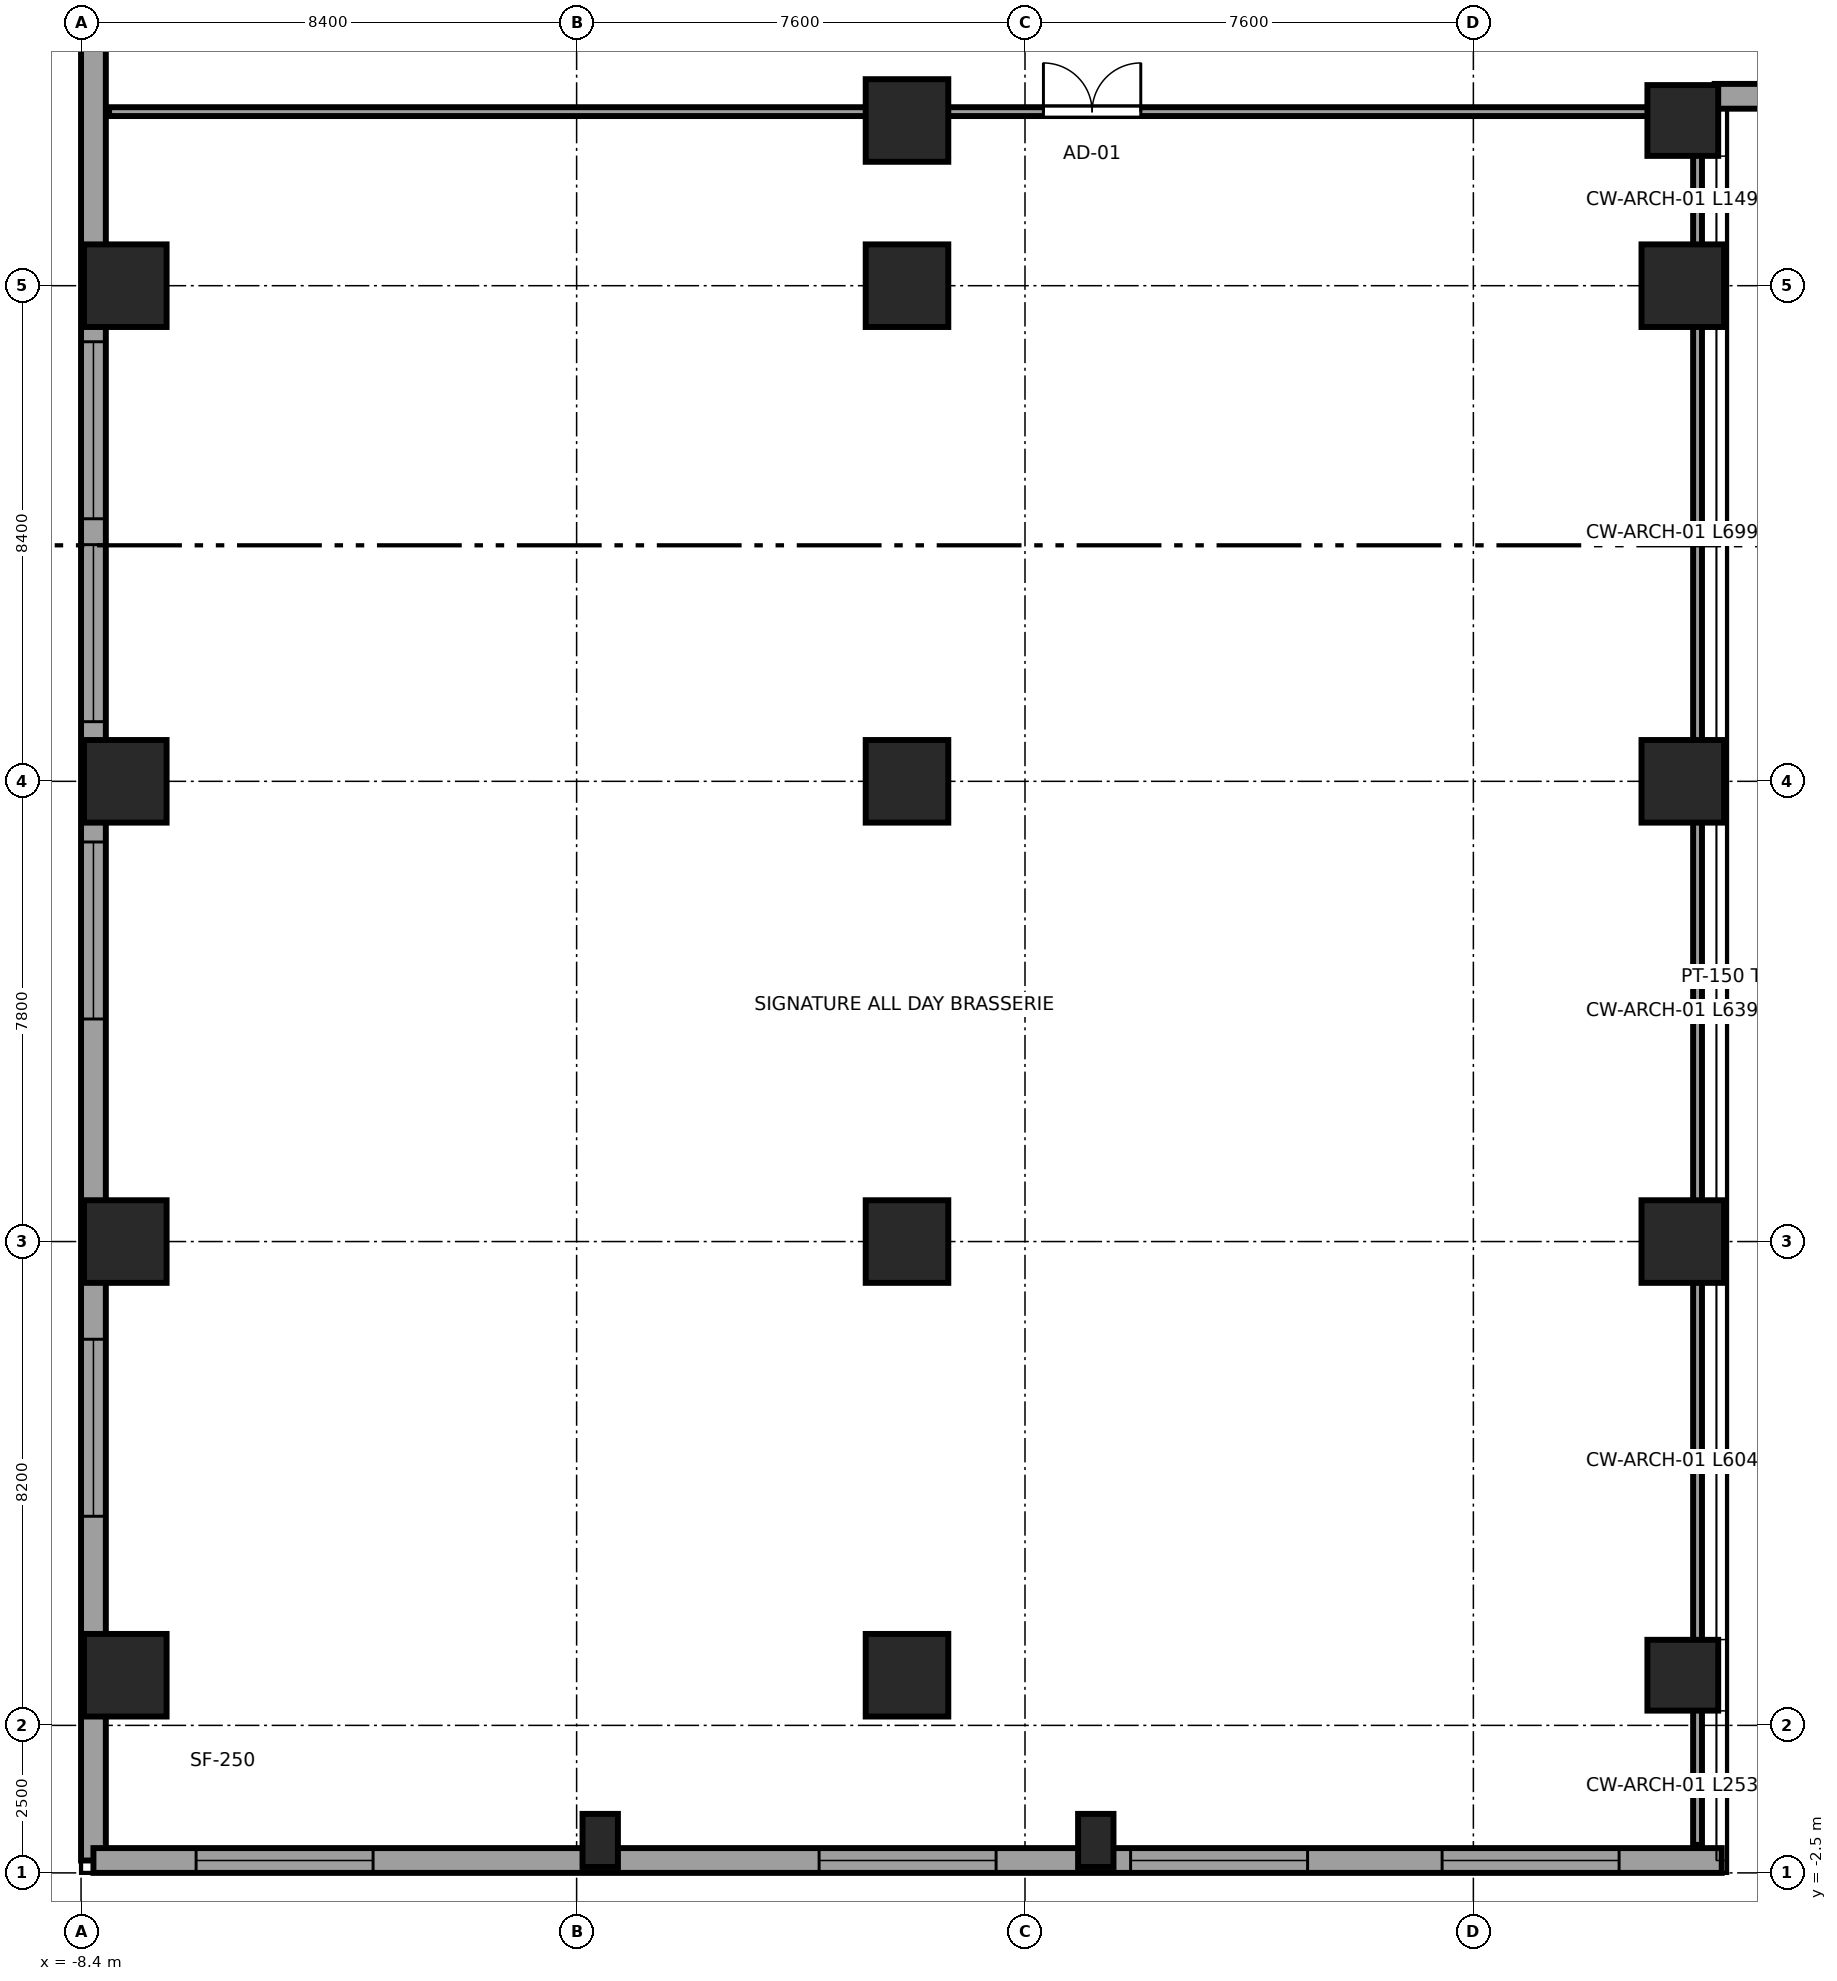
"""IFC4 building model, lengths in metres.
Left out: names, types, materials, properties, quantities, classifications, styles, units other than length and angle.
Written with IfcOpenShell. Run it as: python <this file> out.ifc"""

import sys

from ifc_helpers import new_model, si_unit, direction, frame, frame_2d, origin, origin_2d, place, context, subcontext, project, spatial, rectangle, circle, extrude, source, transform, mapped, element, fill, save


model = new_model("IFC4")
c1 = context("Model", 3, precision=1e-05, world=origin(), true_north=direction((0.0, 1.0)))
c2 = subcontext(c1, "Body", "Model", "MODEL_VIEW")
j1 = project(units=[si_unit("LENGTHUNIT", "METRE"), si_unit("PLANEANGLEUNIT", "RADIAN")], contexts=[c1])
p1 = place(None, origin())
s1 = spatial("IfcSite", under=j1, at=p1, CompositionType="ELEMENT")
p2 = place(p1, origin())
s2 = spatial("IfcBuilding", under=s1, at=p2, CompositionType="ELEMENT")
p3 = place(p2, frame((0.0, 0.0, 6.0)))
s3 = spatial("IfcBuildingStorey", under=s2, at=p3, CompositionType="ELEMENT", Elevation=6.0)
m1 = source(origin(), c2, "Body", "SweptSolid", [
    extrude(rectangle(XDim=1.4, YDim=1.4, at=origin_2d()), origin(), (0.0, 0.0, 1.0), 5.0),
])
for number, where, z_axis, x_axis in (
    (1, (-7.65, 0.85, 0.0), (0.0, 0.0, 1.0), (1.0, 0.0, 0.0)),
    (2, (-7.65, 8.2, 0.0), (0.0, 0.0, 1.0), (1.0, 0.0, 0.0)),
    (3, (-7.65, 16.0, 0.0), (0.0, 0.0, 1.0), (1.0, 0.0, 0.0)),
    (4, (-7.65, 24.4, 0.0), (0.0, 0.0, 1.0), (1.0, 0.0, 0.0)),
):
    element("IfcColumn", number, at=place(p3, frame(where, z_axis=z_axis, x_axis=x_axis)), inside=s3, PredefinedType="COLUMN", context=c2, shape_type="MappedRepresentation", body=[
        mapped(m1, transform((0.0, 0.0, 0.0), x_axis=(1.0, 0.0, 0.0), y_axis=(0.0, 1.0, 0.0), z_axis=(0.0, 0.0, 1.0), scale=1.0)),
    ])
m2 = source(origin(), c2, "Body", "SweptSolid", [
    extrude(circle(Radius=0.6, at=origin_2d()), origin(), (0.0, 0.0, 1.0), 5.0),
])
p4 = place(p3, frame((18.75, 0.85, 0.0), z_axis=(0.0, 0.0, 1.0), x_axis=(1.0, 0.0, 0.0)))
e5 = element("IfcColumn", 5, at=p4, inside=s3, PredefinedType="COLUMN", context=c2, shape_type="MappedRepresentation", body=[
    mapped(m2, transform((0.0, 0.0, 0.0), x_axis=(1.0, 0.0, 0.0), y_axis=(0.0, 1.0, 0.0), z_axis=(0.0, 0.0, 1.0), scale=1.0)),
])
for number, where, z_axis, x_axis in (
    (6, (18.75, 8.2, 0.0), (0.0, 0.0, 1.0), (1.0, 0.0, 0.0)),
    (7, (18.75, 16.0, 0.0), (0.0, 0.0, 1.0), (1.0, 0.0, 0.0)),
    (8, (18.75, 24.4, 0.0), (0.0, 0.0, 1.0), (1.0, 0.0, 0.0)),
):
    element("IfcColumn", number, at=place(p3, frame(where, z_axis=z_axis, x_axis=x_axis)), inside=s3, PredefinedType="COLUMN", context=c2, shape_type="MappedRepresentation", body=[
        mapped(m1, transform((0.0, 0.0, 0.0), x_axis=(1.0, 0.0, 0.0), y_axis=(0.0, 1.0, 0.0), z_axis=(0.0, 0.0, 1.0), scale=1.0)),
    ])
p5 = place(p3, frame((18.75, 27.2, 0.0), z_axis=(0.0, 0.0, 1.0), x_axis=(1.0, 0.0, 0.0)))
e9 = element("IfcColumn", 9, at=p5, inside=s3, PredefinedType="COLUMN", context=c2, shape_type="MappedRepresentation", body=[
    mapped(m2, transform((0.0, 0.0, 0.0), x_axis=(1.0, 0.0, 0.0), y_axis=(0.0, 1.0, 0.0), z_axis=(0.0, 0.0, 1.0), scale=1.0)),
])
for number, where, z_axis, x_axis in (
    (10, (5.6, 0.85, 0.0), (0.0, 0.0, 1.0), (1.0, 0.0, 0.0)),
    (11, (5.6, 8.2, 0.0), (0.0, 0.0, 1.0), (1.0, 0.0, 0.0)),
    (12, (5.6, 16.0, 0.0), (0.0, 0.0, 1.0), (1.0, 0.0, 0.0)),
    (13, (5.6, 24.4, 0.0), (0.0, 0.0, 1.0), (1.0, 0.0, 0.0)),
    (14, (5.6, 27.2, 0.0), (0.0, 0.0, 1.0), (1.0, 0.0, 0.0)),
):
    element("IfcColumn", number, at=place(p3, frame(where, z_axis=z_axis, x_axis=x_axis)), inside=s3, PredefinedType="COLUMN", context=c2, shape_type="MappedRepresentation", body=[
        mapped(m1, transform((0.0, 0.0, 0.0), x_axis=(1.0, 0.0, 0.0), y_axis=(0.0, 1.0, 0.0), z_axis=(0.0, 0.0, 1.0), scale=1.0)),
    ])
m3 = source(origin(), c2, "Body", "SweptSolid", [
    extrude(rectangle(XDim=0.6, YDim=0.9, at=origin_2d()), origin(), (0.0, 0.0, 1.0), 5.0),
])
for number, where, z_axis, x_axis in (
    (15, (0.4, -1.95, 0.0), (0.0, 0.0, 1.0), (1.0, 0.0, 0.0)),
    (16, (8.8, -1.95, 0.0), (0.0, 0.0, 1.0), (1.0, 0.0, 0.0)),
):
    element("IfcColumn", number, at=place(p3, frame(where, z_axis=z_axis, x_axis=x_axis)), inside=s3, PredefinedType="PILASTER", context=c2, shape_type="MappedRepresentation", body=[
        mapped(m3, transform((0.0, 0.0, 0.0), x_axis=(1.0, 0.0, 0.0), y_axis=(0.0, 1.0, 0.0), z_axis=(0.0, 0.0, 1.0), scale=1.0)),
    ])
p6 = place(p3, frame((19.29, 27.61, 0.0), z_axis=(0.0, 0.0, 1.0), x_axis=(1.0, 0.0, 0.0)))
e17 = element("IfcWall", 17, at=p6, inside=s3, PredefinedType="SOLIDWALL", context=c2, shape_type="SweptSolid", body=[
    extrude(rectangle(XDim=18.42, YDim=0.42, at=frame_2d((9.21, 0.0))), origin(), (0.0, 0.0, 1.0), 4.74),
])
p7 = place(p6, frame((1.97, 0.0, 0.65)))
e18 = element("IfcOpeningElement", 18, at=p7, cuts=e17, PredefinedType="OPENING", context=c2, shape_type="SweptSolid", body=[
    extrude(rectangle(XDim=3.0, YDim=2.5, at=frame_2d((1.5, 1.25))), frame((0.0, 0.22, 0.0), z_axis=(0.0, -1.0, 0.0), x_axis=(1.0, 0.0, 0.0)), (0.0, 0.0, 1.0), 0.44),
])
p8 = place(p6, frame((7.71, 0.0, 0.65)))
e19 = element("IfcOpeningElement", 19, at=p8, cuts=e17, PredefinedType="OPENING", context=c2, shape_type="SweptSolid", body=[
    extrude(rectangle(XDim=3.0, YDim=2.5, at=frame_2d((1.5, 1.25))), frame((0.0, 0.22, 0.0), z_axis=(0.0, -1.0, 0.0), x_axis=(1.0, 0.0, 0.0)), (0.0, 0.0, 1.0), 0.44),
])
p9 = place(p6, frame((13.45, 0.0, 0.65)))
e20 = element("IfcOpeningElement", 20, at=p9, cuts=e17, PredefinedType="OPENING", context=c2, shape_type="SweptSolid", body=[
    extrude(rectangle(XDim=3.0, YDim=2.5, at=frame_2d((1.5, 1.25))), frame((0.0, 0.22, 0.0), z_axis=(0.0, -1.0, 0.0), x_axis=(1.0, 0.0, 0.0)), (0.0, 0.0, 1.0), 0.44),
])
p10 = place(p3, frame((-8.19, 48.29, 0.0), z_axis=(0.0, 0.0, 1.0), x_axis=(0.0, -1.0, 0.0)))
e21 = element("IfcWall", 21, at=p10, inside=s3, PredefinedType="SOLIDWALL", context=c2, shape_type="SweptSolid", body=[
    extrude(rectangle(XDim=50.58, YDim=0.42, at=frame_2d((25.29, 0.0))), origin(), (0.0, 0.0, 1.0), 4.74),
])
p11 = place(p10, frame((5.834, 0.0, 0.65)))
e22 = element("IfcOpeningElement", 22, at=p11, cuts=e21, PredefinedType="OPENING", context=c2, shape_type="SweptSolid", body=[
    extrude(rectangle(XDim=3.0, YDim=2.5, at=frame_2d((1.5, 1.25))), frame((0.0, 0.22, 0.0), z_axis=(0.0, -1.0, 0.0), x_axis=(1.0, 0.0, 0.0)), (0.0, 0.0, 1.0), 0.44),
])
p12 = place(p10, frame((10.323, 0.0, 0.65)))
e23 = element("IfcOpeningElement", 23, at=p12, cuts=e21, PredefinedType="OPENING", context=c2, shape_type="SweptSolid", body=[
    extrude(rectangle(XDim=3.0, YDim=2.5, at=frame_2d((1.5, 1.25))), frame((0.0, 0.22, 0.0), z_axis=(0.0, -1.0, 0.0), x_axis=(1.0, 0.0, 0.0)), (0.0, 0.0, 1.0), 0.44),
])
p13 = place(p10, frame((24.84, 0.0, 0.65)))
e24 = element("IfcOpeningElement", 24, at=p13, cuts=e21, PredefinedType="OPENING", context=c2, shape_type="SweptSolid", body=[
    extrude(rectangle(XDim=3.0, YDim=2.5, at=frame_2d((1.5, 1.25))), frame((0.0, 0.22, 0.0), z_axis=(0.0, -1.0, 0.0), x_axis=(1.0, 0.0, 0.0)), (0.0, 0.0, 1.0), 0.44),
])
p14 = place(p10, frame((28.279, 0.0, 0.65)))
e25 = element("IfcOpeningElement", 25, at=p14, cuts=e21, PredefinedType="OPENING", context=c2, shape_type="SweptSolid", body=[
    extrude(rectangle(XDim=3.0, YDim=2.5, at=frame_2d((1.5, 1.25))), frame((0.0, 0.22, 0.0), z_axis=(0.0, -1.0, 0.0), x_axis=(1.0, 0.0, 0.0)), (0.0, 0.0, 1.0), 0.44),
])
p15 = place(p10, frame((33.318, 0.0, 0.65)))
e26 = element("IfcOpeningElement", 26, at=p15, cuts=e21, PredefinedType="OPENING", context=c2, shape_type="SweptSolid", body=[
    extrude(rectangle(XDim=3.0, YDim=2.5, at=frame_2d((1.5, 1.25))), frame((0.0, 0.22, 0.0), z_axis=(0.0, -1.0, 0.0), x_axis=(1.0, 0.0, 0.0)), (0.0, 0.0, 1.0), 0.44),
])
p16 = place(p10, frame((41.746, 0.0, 0.65)))
e27 = element("IfcOpeningElement", 27, at=p16, cuts=e21, PredefinedType="OPENING", context=c2, shape_type="SweptSolid", body=[
    extrude(rectangle(XDim=3.0, YDim=2.5, at=frame_2d((1.5, 1.25))), frame((0.0, 0.22, 0.0), z_axis=(0.0, -1.0, 0.0), x_axis=(1.0, 0.0, 0.0)), (0.0, 0.0, 1.0), 0.44),
])
p17 = place(p3, frame((-8.19, -2.29, 0.0), z_axis=(0.0, 0.0, 1.0), x_axis=(1.0, 0.0, 0.0)))
e28 = element("IfcWall", 28, at=p17, inside=s3, PredefinedType="SOLIDWALL", context=c2, shape_type="SweptSolid", body=[
    extrude(rectangle(XDim=27.6, YDim=0.42, at=frame_2d((13.8, 0.0))), origin(), (0.0, 0.0, 1.0), 4.74),
])
p18 = place(p17, frame((1.74, 0.0, 0.65)))
e29 = element("IfcOpeningElement", 29, at=p18, cuts=e28, PredefinedType="OPENING", context=c2, shape_type="SweptSolid", body=[
    extrude(rectangle(XDim=3.0, YDim=2.5, at=frame_2d((1.5, 1.25))), frame((0.0, 0.22, 0.0), z_axis=(0.0, -1.0, 0.0), x_axis=(1.0, 0.0, 0.0)), (0.0, 0.0, 1.0), 0.44),
])
p19 = place(p17, frame((12.3, 0.0, 0.65)))
e30 = element("IfcOpeningElement", 30, at=p19, cuts=e28, PredefinedType="OPENING", context=c2, shape_type="SweptSolid", body=[
    extrude(rectangle(XDim=3.0, YDim=2.5, at=frame_2d((1.5, 1.25))), frame((0.0, 0.22, 0.0), z_axis=(0.0, -1.0, 0.0), x_axis=(1.0, 0.0, 0.0)), (0.0, 0.0, 1.0), 0.44),
])
p20 = place(p17, frame((17.58, 0.0, 0.65)))
e31 = element("IfcOpeningElement", 31, at=p20, cuts=e28, PredefinedType="OPENING", context=c2, shape_type="SweptSolid", body=[
    extrude(rectangle(XDim=3.0, YDim=2.5, at=frame_2d((1.5, 1.25))), frame((0.0, 0.22, 0.0), z_axis=(0.0, -1.0, 0.0), x_axis=(1.0, 0.0, 0.0)), (0.0, 0.0, 1.0), 0.44),
])
p21 = place(p17, frame((22.86, 0.0, 0.65)))
e32 = element("IfcOpeningElement", 32, at=p21, cuts=e28, PredefinedType="OPENING", context=c2, shape_type="SweptSolid", body=[
    extrude(rectangle(XDim=3.0, YDim=2.5, at=frame_2d((1.5, 1.25))), frame((0.0, 0.22, 0.0), z_axis=(0.0, -1.0, 0.0), x_axis=(1.0, 0.0, 0.0)), (0.0, 0.0, 1.0), 0.44),
])
p22 = place(p3, frame((-7.925, 27.35, 0.0), z_axis=(0.0, 0.0, 1.0), x_axis=(1.0, 0.0, 0.0)))
e33 = element("IfcWall", 33, at=p22, inside=s3, PredefinedType="PARTITIONING", context=c2, shape_type="SweptSolid", body=[
    extrude(rectangle(XDim=26.925, YDim=0.15, at=frame_2d((13.462, 0.0))), origin(), (0.0, 0.0, 1.0), 3.53),
])
p23 = place(p22, frame((15.837, 0.0, 0.0)))
e34 = element("IfcOpeningElement", 34, at=p23, cuts=e33, PredefinedType="OPENING", context=c2, shape_type="SweptSolid", body=[
    extrude(rectangle(XDim=1.65, YDim=2.15, at=frame_2d((0.825, 1.075))), frame((0.0, 0.085, 0.0), z_axis=(0.0, -1.0, 0.0), x_axis=(1.0, 0.0, 0.0)), (0.0, 0.0, 1.0), 0.17),
])
p24 = place(p3, frame((19.0, -2.025, 0.0), z_axis=(0.0, 0.0, 1.0), x_axis=(0.0, 1.0, 0.0)))
e35 = element("IfcWall", 35, at=p24, inside=s3, PredefinedType="PARTITIONING", context=c2, shape_type="SweptSolid", body=[
    extrude(rectangle(XDim=29.425, YDim=0.15, at=frame_2d((14.712, 0.0))), origin(), (0.0, 0.0, 1.0), 4.74),
])
m4 = source(origin(), c2, "Body", "SweptSolid", [
    extrude(rectangle(XDim=3.0, YDim=2.5, at=frame_2d((1.5, 1.25))), frame((0.0, 0.09, 0.0), z_axis=(0.0, -1.0, 0.0), x_axis=(1.0, 0.0, 0.0)), (0.0, 0.0, 1.0), 0.06),
])
p25 = place(p13, origin())
e36 = element("IfcWindow", 36, at=p25, inside=s3, PartitioningType="TRIPLE_PANEL_HORIZONTAL", PredefinedType="WINDOW", context=c2, shape_type="MappedRepresentation", body=[
    mapped(m4, transform((0.0, 0.0, 0.0), x_axis=(1.0, 0.0, 0.0), y_axis=(0.0, 1.0, 0.0), z_axis=(0.0, 0.0, 1.0), scale=1.0)),
])
fill(e24, e36)
p26 = place(p14, origin())
e37 = element("IfcWindow", 37, at=p26, inside=s3, PartitioningType="TRIPLE_PANEL_HORIZONTAL", PredefinedType="WINDOW", context=c2, shape_type="MappedRepresentation", body=[
    mapped(m4, transform((0.0, 0.0, 0.0), x_axis=(1.0, 0.0, 0.0), y_axis=(0.0, 1.0, 0.0), z_axis=(0.0, 0.0, 1.0), scale=1.0)),
])
fill(e25, e37)
p27 = place(p15, origin())
e38 = element("IfcWindow", 38, at=p27, inside=s3, PartitioningType="TRIPLE_PANEL_HORIZONTAL", PredefinedType="WINDOW", context=c2, shape_type="MappedRepresentation", body=[
    mapped(m4, transform((0.0, 0.0, 0.0), x_axis=(1.0, 0.0, 0.0), y_axis=(0.0, 1.0, 0.0), z_axis=(0.0, 0.0, 1.0), scale=1.0)),
])
fill(e26, e38)
p28 = place(p16, origin())
e39 = element("IfcWindow", 39, at=p28, inside=s3, PartitioningType="TRIPLE_PANEL_HORIZONTAL", PredefinedType="WINDOW", context=c2, shape_type="MappedRepresentation", body=[
    mapped(m4, transform((0.0, 0.0, 0.0), x_axis=(1.0, 0.0, 0.0), y_axis=(0.0, 1.0, 0.0), z_axis=(0.0, 0.0, 1.0), scale=1.0)),
])
fill(e27, e39)
p29 = place(p18, origin())
e40 = element("IfcWindow", 40, at=p29, inside=s3, PartitioningType="TRIPLE_PANEL_HORIZONTAL", PredefinedType="WINDOW", context=c2, shape_type="MappedRepresentation", body=[
    mapped(m4, transform((0.0, 0.0, 0.0), x_axis=(1.0, 0.0, 0.0), y_axis=(0.0, 1.0, 0.0), z_axis=(0.0, 0.0, 1.0), scale=1.0)),
])
fill(e29, e40)
p30 = place(p19, origin())
e41 = element("IfcWindow", 41, at=p30, inside=s3, PartitioningType="TRIPLE_PANEL_HORIZONTAL", PredefinedType="WINDOW", context=c2, shape_type="MappedRepresentation", body=[
    mapped(m4, transform((0.0, 0.0, 0.0), x_axis=(1.0, 0.0, 0.0), y_axis=(0.0, 1.0, 0.0), z_axis=(0.0, 0.0, 1.0), scale=1.0)),
])
fill(e30, e41)
p31 = place(p20, origin())
e42 = element("IfcWindow", 42, at=p31, inside=s3, PartitioningType="TRIPLE_PANEL_HORIZONTAL", PredefinedType="WINDOW", context=c2, shape_type="MappedRepresentation", body=[
    mapped(m4, transform((0.0, 0.0, 0.0), x_axis=(1.0, 0.0, 0.0), y_axis=(0.0, 1.0, 0.0), z_axis=(0.0, 0.0, 1.0), scale=1.0)),
])
fill(e31, e42)
p32 = place(p21, origin())
e43 = element("IfcWindow", 43, at=p32, inside=s3, PartitioningType="TRIPLE_PANEL_HORIZONTAL", PredefinedType="WINDOW", context=c2, shape_type="MappedRepresentation", body=[
    mapped(m4, transform((0.0, 0.0, 0.0), x_axis=(1.0, 0.0, 0.0), y_axis=(0.0, 1.0, 0.0), z_axis=(0.0, 0.0, 1.0), scale=1.0)),
])
fill(e32, e43)
m5 = source(origin(), c2, "Body", "SweptSolid", [
    extrude(rectangle(XDim=1.65, YDim=2.15, at=frame_2d((0.825, 1.075))), frame((0.0, 0.025, 0.0), z_axis=(0.0, -1.0, 0.0), x_axis=(1.0, 0.0, 0.0)), (0.0, 0.0, 1.0), 0.05),
])
p33 = place(p23, origin())
e44 = element("IfcDoor", 44, at=p33, inside=s3, OperationType="DOUBLE_DOOR_SINGLE_SWING", PredefinedType="DOOR", context=c2, shape_type="MappedRepresentation", body=[
    mapped(m5, transform((0.0, 0.0, 0.0), x_axis=(1.0, 0.0, 0.0), y_axis=(0.0, 1.0, 0.0), z_axis=(0.0, 0.0, 1.0), scale=1.0)),
])
fill(e34, e44)
save(model, sys.argv[1])
